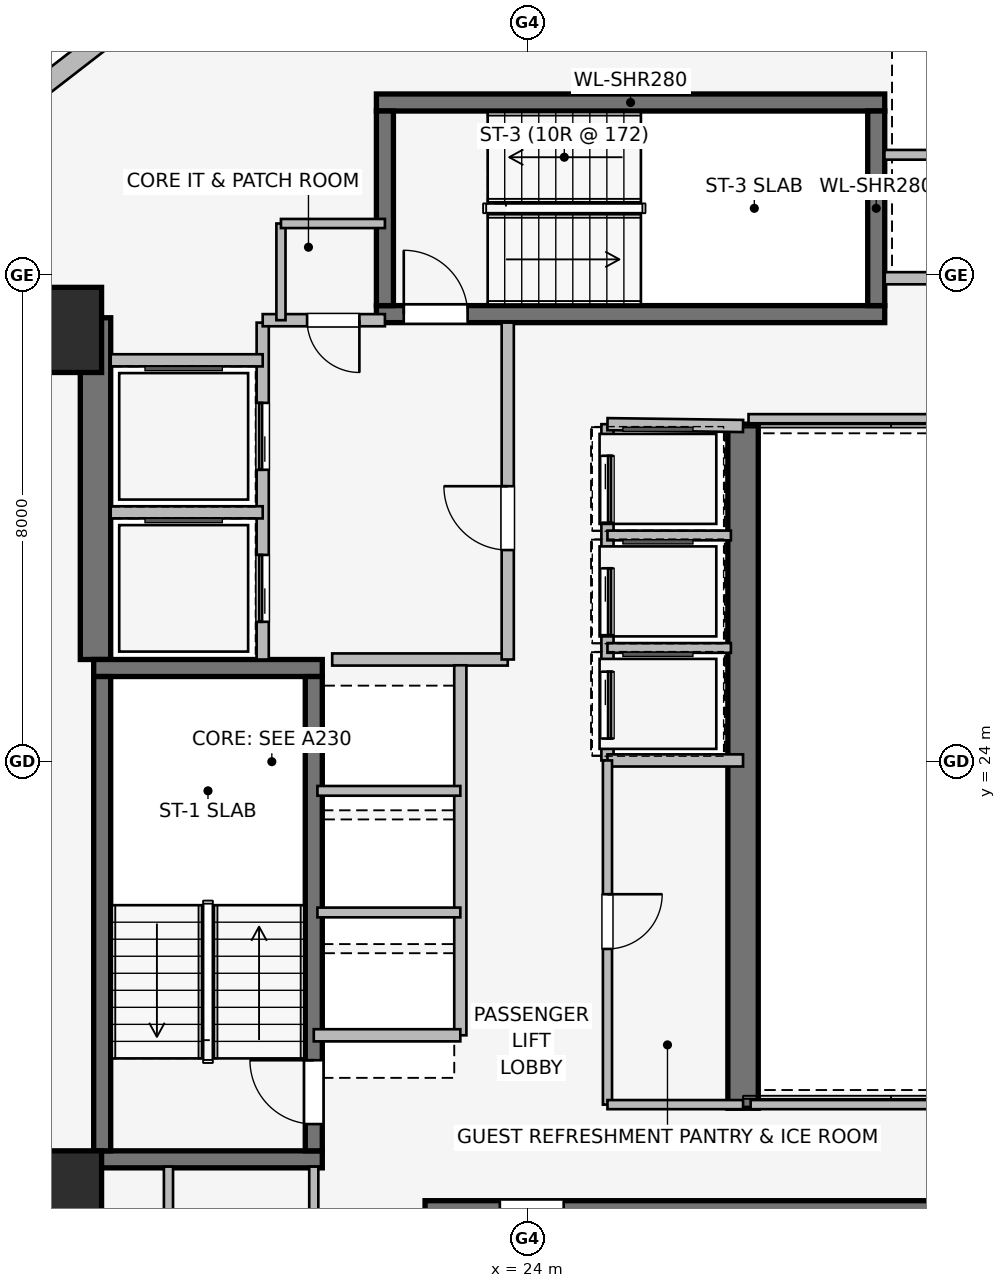
"""IFC4 building model, lengths in metres.
Left out: names, types, materials, properties, quantities, classifications, styles, units other than length and angle.
Written with IfcOpenShell. Run it as: python <this file> out.ifc"""

import sys

from ifc_helpers import new_model, si_unit, direction, frame, frame_2d, origin, origin_2d, place, context, subcontext, project, spatial, rectangle, extrude, element, fill, save


model = new_model("IFC4")
c1 = context("Model", 3, precision=1e-05, world=origin(), true_north=direction((0.0, 1.0)))
c2 = subcontext(c1, "Body", "Model", "MODEL_VIEW")
j1 = project(units=[si_unit("LENGTHUNIT", "METRE"), si_unit("PLANEANGLEUNIT", "RADIAN")], contexts=[c1])
p1 = place(None, origin())
s1 = spatial("IfcSite", under=j1, at=p1, CompositionType="ELEMENT")
p2 = place(p1, origin())
s2 = spatial("IfcBuilding", under=s1, at=p2, CompositionType="ELEMENT")
p3 = place(p2, frame((0.0, 0.0, 108.45)))
s3 = spatial("IfcBuildingStorey", under=s2, at=p3, CompositionType="ELEMENT", Elevation=108.45)
p4 = place(p3, frame((16.9, 25.68, 0.0), z_axis=(0.0, 0.0, 1.0), x_axis=(0.0, 1.0, 0.0)))
e1 = element("IfcWall", 1, at=p4, inside=s3, PredefinedType="SHEAR", context=c2, shape_type="SweptSolid", body=[
    extrude(rectangle(XDim=5.62, YDim=0.5, at=frame_2d((2.81, 0.0))), origin(), (0.0, 0.0, 1.0), 3.45),
])
p5 = place(p3, frame((27.55, 29.55, 0.0), z_axis=(0.0, 0.0, 1.0), x_axis=(0.0, -1.0, 0.0)))
e2 = element("IfcWall", 2, at=p5, inside=s3, PredefinedType="SHEAR", context=c2, shape_type="SweptSolid", body=[
    extrude(rectangle(XDim=11.25, YDim=0.5, at=frame_2d((5.625, 0.0))), origin(), (0.0, 0.0, 1.0), 3.45),
])
for number, where, z_axis, x_axis in (
    (3, (16.87, 17.46, 0.0), (0.0, 0.0, 1.0), (1.0, 0.0, 0.0)),
    (4, (20.63, 25.54, 0.0), (0.0, 0.0, 1.0), (-1.0, 0.0, 0.0)),
):
    element("IfcWall", number, at=place(p3, frame(where, z_axis=z_axis, x_axis=x_axis)), inside=s3, PredefinedType="SHEAR", context=c2, shape_type="SweptSolid", body=[
        extrude(rectangle(XDim=3.76, YDim=0.28, at=frame_2d((1.88, 0.0))), origin(), (0.0, 0.0, 1.0), 3.45),
    ])
p6 = place(p3, frame((17.01, 25.4, 0.0), z_axis=(0.0, 0.0, 1.0), x_axis=(0.0, -1.0, 0.0)))
e5 = element("IfcWall", 5, at=p6, inside=s3, PredefinedType="SHEAR", context=c2, shape_type="SweptSolid", body=[
    extrude(rectangle(XDim=7.8, YDim=0.28, at=frame_2d((3.9, 0.0))), origin(), (0.0, 0.0, 1.0), 3.45),
])
p7 = place(p3, frame((20.49, 17.6, 0.0), z_axis=(0.0, 0.0, 1.0), x_axis=(0.0, 1.0, 0.0)))
e6 = element("IfcWall", 6, at=p7, inside=s3, PredefinedType="SHEAR", context=c2, shape_type="SweptSolid", body=[
    extrude(rectangle(XDim=7.8, YDim=0.28, at=frame_2d((3.9, 0.0))), origin(), (0.0, 0.0, 1.0), 3.45),
])
p8 = place(p7, frame((0.44, 0.0, 0.0)))
e7 = element("IfcOpeningElement", 7, at=p8, cuts=e6, PredefinedType="OPENING", context=c2, shape_type="SweptSolid", body=[
    extrude(rectangle(XDim=1.05, YDim=2.0, at=frame_2d((0.525, 1.0))), frame((0.0, 0.15, 0.0), z_axis=(0.0, -1.0, 0.0), x_axis=(1.0, 0.0, 0.0)), (0.0, 0.0, 1.0), 0.3),
])
p9 = place(p3, frame((30.68, 16.64, 0.0), z_axis=(0.0, 0.0, 1.0), x_axis=(-1.0, 0.0, 0.0)))
e8 = element("IfcWall", 8, at=p9, inside=s3, PredefinedType="SHEAR", context=c2, shape_type="SweptSolid", body=[
    extrude(rectangle(XDim=8.36, YDim=0.28, at=frame_2d((4.18, 0.0))), origin(), (0.0, 0.0, 1.0), 3.45),
])
p10 = place(p9, frame((6.08, 0.0, 0.0)))
e9 = element("IfcOpeningElement", 9, at=p10, cuts=e8, PredefinedType="OPENING", context=c2, shape_type="SweptSolid", body=[
    extrude(rectangle(XDim=1.05, YDim=2.0, at=frame_2d((0.525, 1.0))), frame((0.0, 0.15, 0.0), z_axis=(0.0, -1.0, 0.0), x_axis=(1.0, 0.0, 0.0)), (0.0, 0.0, 1.0), 0.3),
])
p11 = place(p3, frame((21.52, 31.36, 0.0), z_axis=(0.0, 0.0, 1.0), x_axis=(1.0, 0.0, 0.0)))
e10 = element("IfcWall", 10, at=p11, inside=s3, PredefinedType="SHEAR", context=c2, shape_type="SweptSolid", body=[
    extrude(rectangle(XDim=8.36, YDim=0.28, at=frame_2d((4.18, 0.0))), origin(), (0.0, 0.0, 1.0), 3.45),
])
p12 = place(p11, frame((0.45, 0.0, 0.0)))
e11 = element("IfcOpeningElement", 11, at=p12, cuts=e10, PredefinedType="OPENING", context=c2, shape_type="SweptSolid", body=[
    extrude(rectangle(XDim=1.05, YDim=2.0, at=frame_2d((0.525, 1.0))), frame((0.0, 0.15, 0.0), z_axis=(0.0, -1.0, 0.0), x_axis=(1.0, 0.0, 0.0)), (0.0, 0.0, 1.0), 0.3),
])
p13 = place(p3, frame((29.88, 34.84, 0.0), z_axis=(0.0, 0.0, 1.0), x_axis=(-1.0, 0.0, 0.0)))
e12 = element("IfcWall", 12, at=p13, inside=s3, PredefinedType="SHEAR", context=c2, shape_type="SweptSolid", body=[
    extrude(rectangle(XDim=8.36, YDim=0.28, at=frame_2d((4.18, 0.0))), origin(), (0.0, 0.0, 1.0), 3.45),
])
for number, where, z_axis, x_axis in (
    (13, (21.66, 34.7, 0.0), (0.0, 0.0, 1.0), (0.0, -1.0, 0.0)),
    (14, (29.74, 31.5, 0.0), (0.0, 0.0, 1.0), (0.0, 1.0, 0.0)),
):
    element("IfcWall", number, at=place(p3, frame(where, z_axis=z_axis, x_axis=x_axis)), inside=s3, PredefinedType="SHEAR", context=c2, shape_type="SweptSolid", body=[
        extrude(rectangle(XDim=3.2, YDim=0.28, at=frame_2d((1.6, 0.0))), origin(), (0.0, 0.0, 1.0), 3.45),
    ])
for number, where, z_axis, x_axis in (
    (15, (16.3, 16.9, 0.0), (0.0, 0.0, 1.0), (1.0, 0.0, 0.0)),
    (16, (16.3, 31.1, 0.0), (0.0, 0.0, 1.0), (1.0, 0.0, 0.0)),
):
    element("IfcColumn", number, at=place(p3, frame(where, z_axis=z_axis, x_axis=x_axis)), inside=s3, PredefinedType="COLUMN", context=c2, shape_type="SweptSolid", body=[
        extrude(rectangle(XDim=1.4, YDim=1.4, at=origin_2d()), origin(), (0.0, 0.0, 1.0), 3.45),
    ])
p14 = place(p3, frame((15.918, 35.024, 0.0), z_axis=(0.0, 0.0, 1.0), x_axis=(0.790621329885, 0.612305408053, 0.0)))
e17 = element("IfcWall", 17, at=p14, inside=s3, PredefinedType="STANDARD", context=c2, shape_type="SweptSolid", body=[
    extrude(rectangle(XDim=1.676, YDim=0.33, at=frame_2d((0.838, 0.0))), origin(), (0.0, 0.0, 1.0), 3.16),
])
p15 = place(p3, frame((19.65, 25.68, 0.0), z_axis=(0.0, 0.0, 1.0), x_axis=(0.0, 1.0, 0.0)))
e18 = element("IfcWall", 18, at=p15, inside=s3, PredefinedType="PARTITIONING", context=c2, shape_type="SweptSolid", body=[
    extrude(rectangle(XDim=5.54, YDim=0.2, at=frame_2d((2.77, 0.0))), origin(), (0.0, 0.0, 1.0), 3.16),
])
p16 = place(p15, frame((0.62, 0.0, 0.0)))
e19 = element("IfcOpeningElement", 19, at=p16, cuts=e18, PredefinedType="OPENING", context=c2, shape_type="SweptSolid", body=[
    extrude(rectangle(XDim=1.1, YDim=2.2, at=frame_2d((0.55, 1.1))), frame((0.0, 0.11, 0.0), z_axis=(0.0, -1.0, 0.0), x_axis=(1.0, 0.0, 0.0)), (0.0, 0.0, 1.0), 0.22),
])
p17 = place(p15, frame((3.12, 0.0, 0.0)))
e20 = element("IfcOpeningElement", 20, at=p17, cuts=e18, PredefinedType="OPENING", context=c2, shape_type="SweptSolid", body=[
    extrude(rectangle(XDim=1.1, YDim=2.2, at=frame_2d((0.55, 1.1))), frame((0.0, 0.11, 0.0), z_axis=(0.0, -1.0, 0.0), x_axis=(1.0, 0.0, 0.0)), (0.0, 0.0, 1.0), 0.22),
])
p18 = place(p3, frame((20.793, 25.68, 0.0), z_axis=(0.0, 0.0, 1.0), x_axis=(1.0, 0.0, 0.0)))
e21 = element("IfcWall", 21, at=p18, inside=s3, PredefinedType="PARTITIONING", context=c2, shape_type="SweptSolid", body=[
    extrude(rectangle(XDim=2.887, YDim=0.2, at=frame_2d((1.443, 0.0))), origin(), (0.0, 0.0, 1.0), 3.16),
])
p19 = place(p3, frame((23.68, 25.68, 0.0), z_axis=(0.0, 0.0, 1.0), x_axis=(0.0, 1.0, 0.0)))
e22 = element("IfcWall", 22, at=p19, inside=s3, PredefinedType="PARTITIONING", context=c2, shape_type="SweptSolid", body=[
    extrude(rectangle(XDim=5.54, YDim=0.2, at=frame_2d((2.77, 0.0))), origin(), (0.0, 0.0, 1.0), 3.16),
])
p20 = place(p19, frame((1.8, 0.0, 0.0)))
e23 = element("IfcOpeningElement", 23, at=p20, cuts=e22, PredefinedType="OPENING", context=c2, shape_type="SweptSolid", body=[
    extrude(rectangle(XDim=1.05, YDim=2.0, at=frame_2d((0.525, 1.0))), frame((0.0, 0.11, 0.0), z_axis=(0.0, -1.0, 0.0), x_axis=(1.0, 0.0, 0.0)), (0.0, 0.0, 1.0), 0.22),
])
p21 = place(p3, frame((21.66, 31.26, 0.0), z_axis=(0.0, 0.0, 1.0), x_axis=(-1.0, 0.0, 0.0)))
e24 = element("IfcWall", 24, at=p21, inside=s3, PredefinedType="PARTITIONING", context=c2, shape_type="SweptSolid", body=[
    extrude(rectangle(XDim=2.01, YDim=0.2, at=frame_2d((1.005, 0.0))), origin(), (0.0, 0.0, 1.0), 3.16),
])
p22 = place(p21, frame((0.42, 0.0, 0.0)))
e25 = element("IfcOpeningElement", 25, at=p22, cuts=e24, PredefinedType="OPENING", context=c2, shape_type="SweptSolid", body=[
    extrude(rectangle(XDim=0.86, YDim=2.0, at=frame_2d((0.43, 1.0))), frame((0.0, 0.11, 0.0), z_axis=(0.0, -1.0, 0.0), x_axis=(1.0, 0.0, 0.0)), (0.0, 0.0, 1.0), 0.22),
])
p23 = place(p3, frame((17.15, 28.1, 0.0), z_axis=(0.0, 0.0, 1.0), x_axis=(1.0, 0.0, 0.0)))
e26 = element("IfcWall", 26, at=p23, inside=s3, PredefinedType="PARTITIONING", context=c2, shape_type="SweptSolid", body=[
    extrude(rectangle(XDim=2.5, YDim=0.2, at=frame_2d((1.25, 0.0))), origin(), (0.0, 0.0, 1.0), 3.16),
])
p24 = place(p3, frame((19.65, 30.6, 0.0), z_axis=(0.0, 0.0, 1.0), x_axis=(-1.0, 0.0, 0.0)))
e27 = element("IfcWall", 27, at=p24, inside=s3, PredefinedType="PARTITIONING", context=c2, shape_type="SweptSolid", body=[
    extrude(rectangle(XDim=2.5, YDim=0.2, at=frame_2d((1.25, 0.0))), origin(), (0.0, 0.0, 1.0), 2.06),
])
p25 = place(p3, frame((32.48, 31.95, 0.0), z_axis=(0.0, 0.0, 1.0), x_axis=(-1.0, 0.0, 0.0)))
e28 = element("IfcWall", 28, at=p25, inside=s3, PredefinedType="PARTITIONING", context=c2, shape_type="SweptSolid", body=[
    extrude(rectangle(XDim=2.6, YDim=0.2, at=frame_2d((1.3, 0.0))), origin(), (0.0, 0.0, 1.0), 3.16),
])
p26 = place(p3, frame((29.875, 33.98, 0.0), z_axis=(0.0, 0.0, 1.0), x_axis=(1.0, 0.0, 0.0)))
e29 = element("IfcWall", 29, at=p26, inside=s3, PredefinedType="PARTITIONING", context=c2, shape_type="SweptSolid", body=[
    extrude(rectangle(XDim=2.605, YDim=0.16, at=frame_2d((1.302, 0.0))), origin(), (0.0, 0.0, 1.0), 3.16),
])
p27 = place(p3, frame((22.9, 19.5, 0.0), z_axis=(0.0, 0.0, 1.0), x_axis=(0.0, 1.0, 0.0)))
e30 = element("IfcWall", 30, at=p27, inside=s3, PredefinedType="PARTITIONING", context=c2, shape_type="SweptSolid", body=[
    extrude(rectangle(XDim=6.085, YDim=0.2, at=frame_2d((3.042, 0.0))), origin(), (0.0, 0.0, 1.0), 3.16),
])
p28 = place(p3, frame((20.49, 19.5, 0.0), z_axis=(0.0, 0.0, 1.0), x_axis=(1.0, 0.0, 0.0)))
e31 = element("IfcWall", 31, at=p28, inside=s3, PredefinedType="PARTITIONING", context=c2, shape_type="SweptSolid", body=[
    extrude(rectangle(XDim=2.41, YDim=0.2, at=frame_2d((1.205, 0.0))), origin(), (0.0, 0.0, 1.0), 2.06),
])
for number, where, z_axis, x_axis in (
    (32, (20.55, 21.52, 0.0), (0.0, 0.0, 1.0), (1.0, 0.0, 0.0)),
    (33, (20.55, 23.52, 0.0), (0.0, 0.0, 1.0), (1.0, 0.0, 0.0)),
):
    element("IfcWall", number, at=place(p3, frame(where, z_axis=z_axis, x_axis=x_axis)), inside=s3, PredefinedType="PARTITIONING", context=c2, shape_type="SweptSolid", body=[
        extrude(rectangle(XDim=2.35, YDim=0.16, at=frame_2d((1.175, 0.0))), origin(), (0.0, 0.0, 1.0), 3.16),
    ])
p29 = place(p3, frame((25.32, 29.55, 0.0), z_axis=(0.0, 0.0, 1.0), x_axis=(0.0, -1.0, 0.0)))
e34 = element("IfcWall", 34, at=p29, inside=s3, PredefinedType="PARTITIONING", context=c2, shape_type="SweptSolid", body=[
    extrude(rectangle(XDim=5.53, YDim=0.2, at=frame_2d((2.765, 0.0))), origin(), (0.0, 0.0, 1.0), 3.16),
])
p30 = place(p29, frame((0.52, 0.0, 0.0)))
e35 = element("IfcOpeningElement", 35, at=p30, cuts=e34, PredefinedType="OPENING", context=c2, shape_type="SweptSolid", body=[
    extrude(rectangle(XDim=1.1, YDim=2.2, at=frame_2d((0.55, 1.1))), frame((0.0, 0.11, 0.0), z_axis=(0.0, -1.0, 0.0), x_axis=(1.0, 0.0, 0.0)), (0.0, 0.0, 1.0), 0.22),
])
p31 = place(p29, frame((2.37, 0.0, 0.0)))
e36 = element("IfcOpeningElement", 36, at=p31, cuts=e34, PredefinedType="OPENING", context=c2, shape_type="SweptSolid", body=[
    extrude(rectangle(XDim=1.1, YDim=2.2, at=frame_2d((0.55, 1.1))), frame((0.0, 0.11, 0.0), z_axis=(0.0, -1.0, 0.0), x_axis=(1.0, 0.0, 0.0)), (0.0, 0.0, 1.0), 0.22),
])
p32 = place(p29, frame((4.07, 0.0, 0.0)))
e37 = element("IfcOpeningElement", 37, at=p32, cuts=e34, PredefinedType="OPENING", context=c2, shape_type="SweptSolid", body=[
    extrude(rectangle(XDim=1.1, YDim=2.2, at=frame_2d((0.55, 1.1))), frame((0.0, 0.11, 0.0), z_axis=(0.0, -1.0, 0.0), x_axis=(1.0, 0.0, 0.0)), (0.0, 0.0, 1.0), 0.22),
])
p33 = place(p3, frame((27.55, 29.52, 0.0), z_axis=(0.0, 0.0, 1.0), x_axis=(-0.999909343457, 0.013464949556, 0.0)))
e38 = element("IfcWall", 38, at=p33, inside=s3, PredefinedType="PARTITIONING", context=c2, shape_type="SweptSolid", body=[
    extrude(rectangle(XDim=2.23, YDim=0.2, at=frame_2d((1.115, 0.0))), origin(), (0.0, 0.0, 1.0), 2.06),
])
p34 = place(p3, frame((25.32, 24.02, 0.0), z_axis=(0.0, 0.0, 1.0), x_axis=(1.0, 0.0, 0.0)))
e39 = element("IfcWall", 39, at=p34, inside=s3, PredefinedType="PARTITIONING", context=c2, shape_type="SweptSolid", body=[
    extrude(rectangle(XDim=2.23, YDim=0.2, at=frame_2d((1.115, 0.0))), origin(), (0.0, 0.0, 1.0), 3.16),
])
for number, where, z_axis, x_axis in (
    (40, (25.32, 25.87, 0.0), (0.0, 0.0, 1.0), (1.0, 0.0, 0.0)),
    (41, (25.32, 27.72, 0.0), (0.0, 0.0, 1.0), (1.0, 0.0, 0.0)),
):
    element("IfcWall", number, at=place(p3, frame(where, z_axis=z_axis, x_axis=x_axis)), inside=s3, PredefinedType="PARTITIONING", context=c2, shape_type="SweptSolid", body=[
        extrude(rectangle(XDim=2.03, YDim=0.16, at=frame_2d((1.015, 0.0))), origin(), (0.0, 0.0, 1.0), 3.16),
    ])
p35 = place(p3, frame((25.32, 24.02, 0.0), z_axis=(0.0, 0.0, 1.0), x_axis=(0.0, -1.0, 0.0)))
e42 = element("IfcWall", 42, at=p35, inside=s3, PredefinedType="PARTITIONING", context=c2, shape_type="SweptSolid", body=[
    extrude(rectangle(XDim=5.66, YDim=0.15, at=frame_2d((2.83, 0.0))), origin(), (0.0, 0.0, 1.0), 3.16),
])
p36 = place(p35, frame((2.2, 0.0, 0.0)))
e43 = element("IfcOpeningElement", 43, at=p36, cuts=e42, PredefinedType="OPENING", context=c2, shape_type="SweptSolid", body=[
    extrude(rectangle(XDim=0.9, YDim=2.0, at=frame_2d((0.45, 1.0))), frame((0.0, 0.085, 0.0), z_axis=(0.0, -1.0, 0.0), x_axis=(1.0, 0.0, 0.0)), (0.0, 0.0, 1.0), 0.17),
])
p37 = place(p3, frame((25.32, 18.36, 0.0), z_axis=(0.0, 0.0, 1.0), x_axis=(1.0, 0.0, 0.0)))
e44 = element("IfcWall", 44, at=p37, inside=s3, PredefinedType="PARTITIONING", context=c2, shape_type="SweptSolid", body=[
    extrude(rectangle(XDim=2.23, YDim=0.15, at=frame_2d((1.115, 0.0))), origin(), (0.0, 0.0, 1.0), 3.16),
])
p38 = place(p3, frame((18.1, 17.34, 0.0), z_axis=(0.0, 0.0, 1.0), x_axis=(0.0, -1.0, 0.0)))
e45 = element("IfcWall", 45, at=p38, inside=s3, PredefinedType="PARTITIONING", context=c2, shape_type="SweptSolid", body=[
    extrude(rectangle(XDim=4.14, YDim=0.15, at=frame_2d((2.07, 0.0))), origin(), (0.0, 0.0, 1.0), 3.16),
])
p39 = place(p3, frame((20.49, 13.2, 0.0), z_axis=(0.0, 0.0, 1.0), x_axis=(0.0, 1.0, 0.0)))
e46 = element("IfcWall", 46, at=p39, inside=s3, PredefinedType="PARTITIONING", context=c2, shape_type="SweptSolid", body=[
    extrude(rectangle(XDim=4.14, YDim=0.15, at=frame_2d((2.07, 0.0))), origin(), (0.0, 0.0, 1.0), 3.16),
])
p40 = place(p39, frame((1.25, 0.0, 0.0)))
e47 = element("IfcOpeningElement", 47, at=p40, cuts=e46, PredefinedType="OPENING", context=c2, shape_type="SweptSolid", body=[
    extrude(rectangle(XDim=0.9, YDim=2.0, at=frame_2d((0.45, 1.0))), frame((0.0, 0.085, 0.0), z_axis=(0.0, -1.0, 0.0), x_axis=(1.0, 0.0, 0.0)), (0.0, 0.0, 1.0), 0.17),
])
p41 = place(p3, frame((19.95, 32.85, 0.0), z_axis=(0.0, 0.0, 1.0), x_axis=(0.0, -1.0, 0.0)))
e48 = element("IfcWall", 48, at=p41, inside=s3, PredefinedType="PARTITIONING", context=c2, shape_type="SweptSolid", body=[
    extrude(rectangle(XDim=1.59, YDim=0.15, at=frame_2d((0.795, 0.0))), origin(), (0.0, 0.0, 1.0), 3.16),
])
p42 = place(p3, frame((21.66, 32.85, 0.0), z_axis=(0.0, 0.0, 1.0), x_axis=(-1.0, 0.0, 0.0)))
e49 = element("IfcWall", 49, at=p42, inside=s3, PredefinedType="PARTITIONING", context=c2, shape_type="SweptSolid", body=[
    extrude(rectangle(XDim=1.71, YDim=0.15, at=frame_2d((0.855, 0.0))), origin(), (0.0, 0.0, 1.0), 3.16),
])
p43 = place(p3, frame((27.675, 18.36, 0.0), z_axis=(0.0, 0.0, 1.0), x_axis=(1.0, 0.0, 0.0)))
e50 = element("IfcWall", 50, at=p43, inside=s3, PredefinedType="PARTITIONING", context=c2, shape_type="SweptSolid", body=[
    extrude(rectangle(XDim=12.165, YDim=0.15, at=frame_2d((6.083, 0.0))), origin(), (0.0, 0.0, 1.0), 2.301),
])
p44 = place(p3, frame((39.84, 29.64, 0.0), z_axis=(0.0, 0.0, 1.0), x_axis=(-1.0, 0.0, 0.0)))
e51 = element("IfcWall", 51, at=p44, inside=s3, PredefinedType="PARTITIONING", context=c2, shape_type="SweptSolid", body=[
    extrude(rectangle(XDim=12.2, YDim=0.15, at=frame_2d((6.1, 0.0))), origin(), (0.0, 0.0, 1.0), 2.301),
])
p45 = place(p8, origin())
e52 = element("IfcDoor", 52, at=p45, inside=s3, OperationType="SINGLE_SWING_RIGHT", PredefinedType="DOOR", context=c2, shape_type="SweptSolid", body=[
    extrude(rectangle(XDim=1.05, YDim=2.0, at=frame_2d((0.525, 1.0))), frame((0.0, 0.025, 0.0), z_axis=(0.0, -1.0, 0.0), x_axis=(1.0, 0.0, 0.0)), (0.0, 0.0, 1.0), 0.05),
])
fill(e7, e52)
p46 = place(p10, origin())
e53 = element("IfcDoor", 53, at=p46, inside=s3, OperationType="SINGLE_SWING_RIGHT", PredefinedType="DOOR", context=c2, shape_type="SweptSolid", body=[
    extrude(rectangle(XDim=1.05, YDim=2.0, at=frame_2d((0.525, 1.0))), frame((0.0, 0.025, 0.0), z_axis=(0.0, -1.0, 0.0), x_axis=(1.0, 0.0, 0.0)), (0.0, 0.0, 1.0), 0.05),
])
fill(e9, e53)
p47 = place(p12, origin())
e54 = element("IfcDoor", 54, at=p47, inside=s3, OperationType="SINGLE_SWING_LEFT", PredefinedType="DOOR", context=c2, shape_type="SweptSolid", body=[
    extrude(rectangle(XDim=1.05, YDim=2.0, at=frame_2d((0.525, 1.0))), frame((0.0, 0.025, 0.0), z_axis=(0.0, -1.0, 0.0), x_axis=(1.0, 0.0, 0.0)), (0.0, 0.0, 1.0), 0.05),
])
fill(e11, e54)
p48 = place(p16, origin())
e55 = element("IfcDoor", 55, at=p48, inside=s3, OperationType="SLIDING_TO_LEFT", PredefinedType="DOOR", context=c2, shape_type="SweptSolid", body=[
    extrude(rectangle(XDim=1.1, YDim=2.2, at=frame_2d((0.55, 1.1))), frame((0.0, 0.025, 0.0), z_axis=(0.0, -1.0, 0.0), x_axis=(1.0, 0.0, 0.0)), (0.0, 0.0, 1.0), 0.05),
])
fill(e19, e55)
p49 = place(p17, origin())
e56 = element("IfcDoor", 56, at=p49, inside=s3, OperationType="SLIDING_TO_LEFT", PredefinedType="DOOR", context=c2, shape_type="SweptSolid", body=[
    extrude(rectangle(XDim=1.1, YDim=2.2, at=frame_2d((0.55, 1.1))), frame((0.0, 0.025, 0.0), z_axis=(0.0, -1.0, 0.0), x_axis=(1.0, 0.0, 0.0)), (0.0, 0.0, 1.0), 0.05),
])
fill(e20, e56)
p50 = place(p20, origin())
e57 = element("IfcDoor", 57, at=p50, inside=s3, OperationType="SINGLE_SWING_RIGHT", PredefinedType="DOOR", context=c2, shape_type="SweptSolid", body=[
    extrude(rectangle(XDim=1.05, YDim=2.0, at=frame_2d((0.525, 1.0))), frame((0.0, 0.025, 0.0), z_axis=(0.0, -1.0, 0.0), x_axis=(1.0, 0.0, 0.0)), (0.0, 0.0, 1.0), 0.05),
])
fill(e23, e57)
p51 = place(p22, origin())
e58 = element("IfcDoor", 58, at=p51, inside=s3, OperationType="SINGLE_SWING_LEFT", PredefinedType="DOOR", context=c2, shape_type="SweptSolid", body=[
    extrude(rectangle(XDim=0.86, YDim=2.0, at=frame_2d((0.43, 1.0))), frame((0.0, 0.025, 0.0), z_axis=(0.0, -1.0, 0.0), x_axis=(1.0, 0.0, 0.0)), (0.0, 0.0, 1.0), 0.05),
])
fill(e25, e58)
p52 = place(p30, origin())
e59 = element("IfcDoor", 59, at=p52, inside=s3, OperationType="SLIDING_TO_LEFT", PredefinedType="DOOR", context=c2, shape_type="SweptSolid", body=[
    extrude(rectangle(XDim=1.1, YDim=2.2, at=frame_2d((0.55, 1.1))), frame((0.0, 0.025, 0.0), z_axis=(0.0, -1.0, 0.0), x_axis=(1.0, 0.0, 0.0)), (0.0, 0.0, 1.0), 0.05),
])
fill(e35, e59)
p53 = place(p31, origin())
e60 = element("IfcDoor", 60, at=p53, inside=s3, OperationType="SLIDING_TO_LEFT", PredefinedType="DOOR", context=c2, shape_type="SweptSolid", body=[
    extrude(rectangle(XDim=1.1, YDim=2.2, at=frame_2d((0.55, 1.1))), frame((0.0, 0.025, 0.0), z_axis=(0.0, -1.0, 0.0), x_axis=(1.0, 0.0, 0.0)), (0.0, 0.0, 1.0), 0.05),
])
fill(e36, e60)
p54 = place(p32, origin())
e61 = element("IfcDoor", 61, at=p54, inside=s3, OperationType="SLIDING_TO_LEFT", PredefinedType="DOOR", context=c2, shape_type="SweptSolid", body=[
    extrude(rectangle(XDim=1.1, YDim=2.2, at=frame_2d((0.55, 1.1))), frame((0.0, 0.025, 0.0), z_axis=(0.0, -1.0, 0.0), x_axis=(1.0, 0.0, 0.0)), (0.0, 0.0, 1.0), 0.05),
])
fill(e37, e61)
p55 = place(p36, origin())
e62 = element("IfcDoor", 62, at=p55, inside=s3, OperationType="SINGLE_SWING_LEFT", PredefinedType="DOOR", context=c2, shape_type="SweptSolid", body=[
    extrude(rectangle(XDim=0.9, YDim=2.0, at=frame_2d((0.45, 1.0))), frame((0.0, 0.025, 0.0), z_axis=(0.0, -1.0, 0.0), x_axis=(1.0, 0.0, 0.0)), (0.0, 0.0, 1.0), 0.05),
])
fill(e43, e62)
save(model, sys.argv[1])
